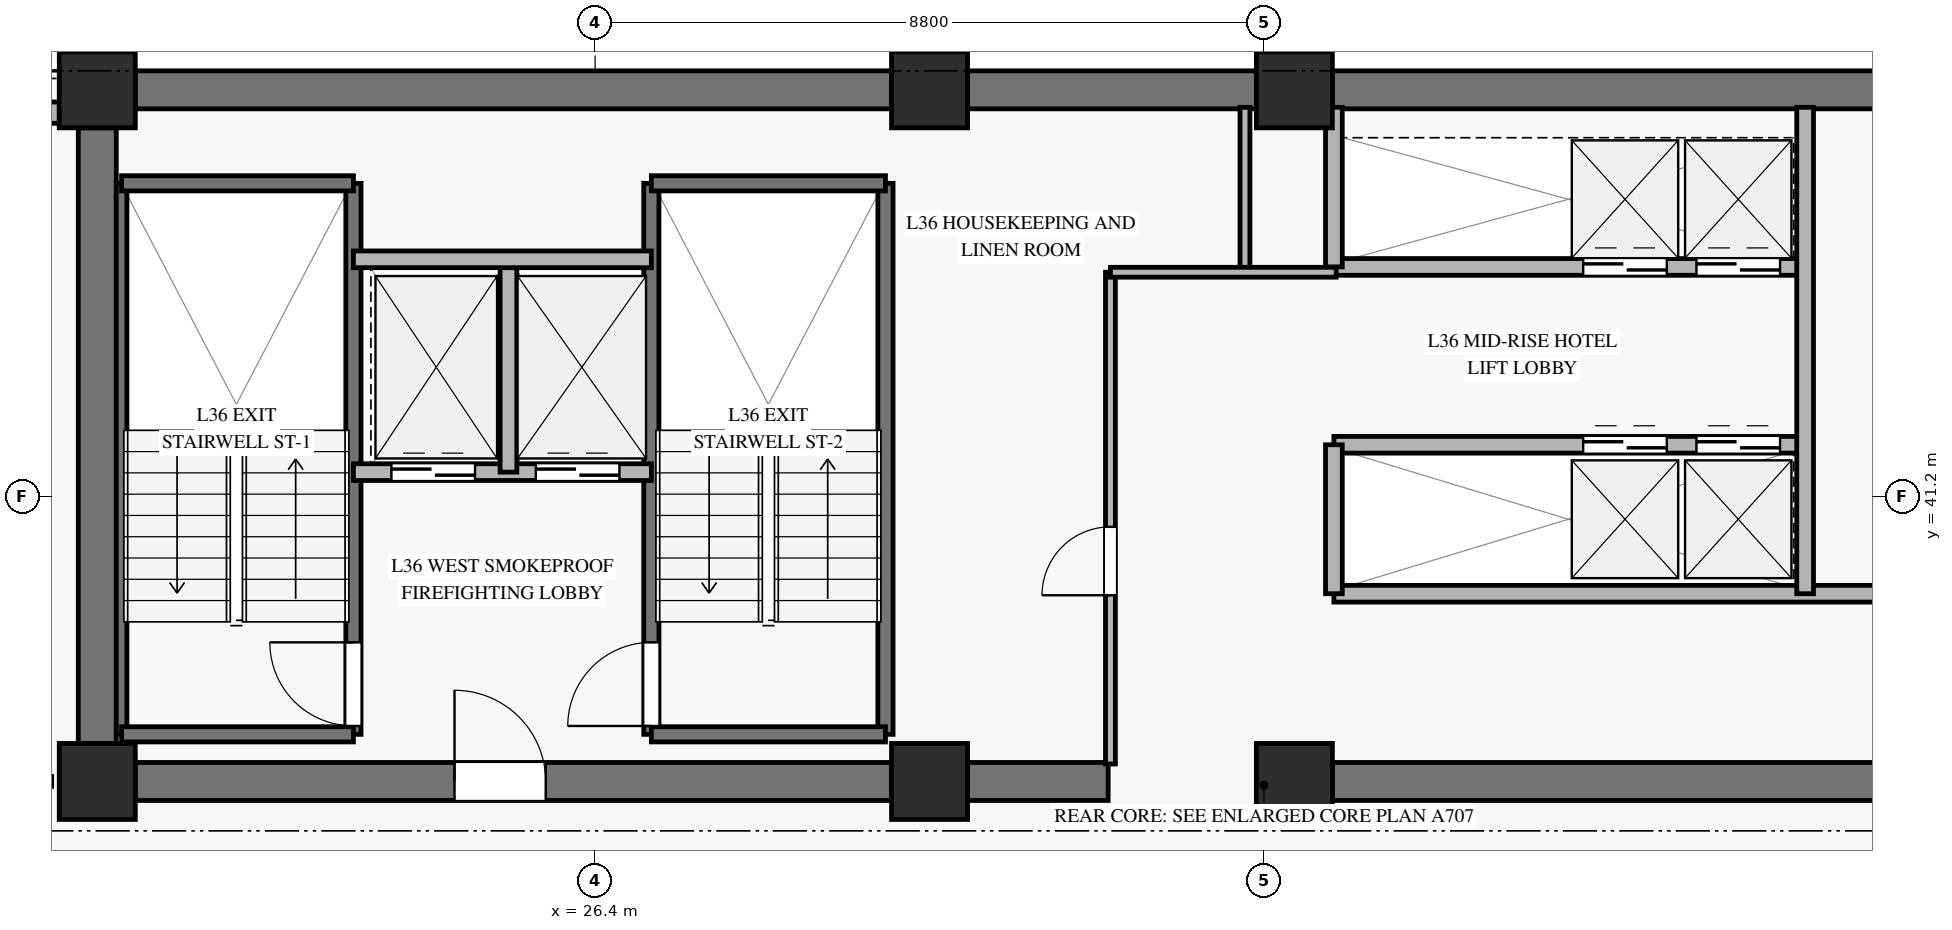
"""IFC4 building model, lengths in metres.
Left out: names, types, materials, properties, quantities, classifications, styles, units other than length and angle.
Written with IfcOpenShell. Run it as: python <this file> out.ifc"""

import sys

from ifc_helpers import new_model, si_unit, direction, frame, frame_2d, origin, origin_2d, place, context, subcontext, project, spatial, rectangle, extrude, source, transform, mapped, element, fill, save


model = new_model("IFC4")
c1 = context("Model", 3, precision=1e-05, world=origin(), true_north=direction((0.0, 1.0)))
c2 = subcontext(c1, "Body", "Model", "MODEL_VIEW")
j1 = project(units=[si_unit("LENGTHUNIT", "METRE"), si_unit("PLANEANGLEUNIT", "RADIAN")], contexts=[c1])
p1 = place(None, origin())
s1 = spatial("IfcSite", under=j1, at=p1, CompositionType="ELEMENT")
p2 = place(p1, origin())
s2 = spatial("IfcBuilding", under=s1, at=p2, CompositionType="ELEMENT")
p3 = place(p2, frame((0.0, 0.0, 149.2)))
s3 = spatial("IfcBuildingStorey", under=s2, at=p3, CompositionType="ELEMENT", Elevation=149.2)
m1 = source(origin(), c2, "Body", "SweptSolid", [
    extrude(rectangle(XDim=1.0, YDim=1.0, at=origin_2d()), origin(), (0.0, 0.0, 1.0), 3.27),
])
for number, where, z_axis, x_axis in (
    (1, (19.85, 37.45, 0.0), (0.0, 0.0, 1.0), (1.0, 0.0, 0.0)),
    (2, (19.85, 46.55, 0.0), (0.0, 0.0, 1.0), (1.0, 0.0, 0.0)),
    (3, (30.8, 37.45, 0.0), (0.0, 0.0, 1.0), (1.0, 0.0, 0.0)),
    (4, (30.8, 46.55, 0.0), (0.0, 0.0, 1.0), (1.0, 0.0, 0.0)),
    (5, (35.6, 37.45, 0.0), (0.0, 0.0, 1.0), (1.0, 0.0, 0.0)),
    (6, (35.6, 46.55, 0.0), (0.0, 0.0, 1.0), (1.0, 0.0, 0.0)),
):
    element("IfcColumn", number, at=place(p3, frame(where, z_axis=z_axis, x_axis=x_axis)), inside=s3, PredefinedType="PILASTER", context=c2, shape_type="MappedRepresentation", body=[
        mapped(m1, transform((0.0, 0.0, 0.0), x_axis=(1.0, 0.0, 0.0), y_axis=(0.0, 1.0, 0.0), z_axis=(0.0, 0.0, 1.0), scale=1.0)),
    ])
p4 = place(p3, frame((20.35, 46.55, 0.0), z_axis=(0.0, 0.0, 1.0), x_axis=(1.0, 0.0, 0.0)))
e7 = element("IfcWall", 7, at=p4, inside=s3, PredefinedType="SHEAR", context=c2, shape_type="SweptSolid", body=[
    extrude(rectangle(XDim=9.95, YDim=0.5, at=frame_2d((4.975, 0.0))), origin(), (0.0, 0.0, 1.0), 3.27),
])
p5 = place(p3, frame((31.3, 46.55, 0.0), z_axis=(0.0, 0.0, 1.0), x_axis=(1.0, 0.0, 0.0)))
e8 = element("IfcWall", 8, at=p5, inside=s3, PredefinedType="SHEAR", context=c2, shape_type="SweptSolid", body=[
    extrude(rectangle(XDim=3.8, YDim=0.5, at=frame_2d((1.9, 0.0))), origin(), (0.0, 0.0, 1.0), 3.27),
])
p6 = place(p3, frame((36.1, 46.55, 0.0), z_axis=(0.0, 0.0, 1.0), x_axis=(1.0, 0.0, 0.0)))
e9 = element("IfcWall", 9, at=p6, inside=s3, PredefinedType="SHEAR", context=c2, shape_type="SweptSolid", body=[
    extrude(rectangle(XDim=7.7, YDim=0.5, at=frame_2d((3.85, 0.0))), origin(), (0.0, 0.0, 1.0), 3.27),
])
p7 = place(p3, frame((20.35, 37.45, 0.0), z_axis=(0.0, 0.0, 1.0), x_axis=(1.0, 0.0, 0.0)))
e10 = element("IfcWall", 10, at=p7, inside=s3, PredefinedType="SHEAR", context=c2, shape_type="SweptSolid", body=[
    extrude(rectangle(XDim=9.95, YDim=0.5, at=frame_2d((4.975, 0.0))), origin(), (0.0, 0.0, 1.0), 3.27),
])
p8 = place(p7, frame((4.2, 0.0, 0.0)))
e11 = element("IfcOpeningElement", 11, at=p8, cuts=e10, PredefinedType="OPENING", context=c2, shape_type="SweptSolid", body=[
    extrude(rectangle(XDim=1.2, YDim=2.15, at=frame_2d((0.6, 1.075))), frame((0.0, 0.26, 0.0), z_axis=(0.0, -1.0, 0.0), x_axis=(1.0, 0.0, 0.0)), (0.0, 0.0, 1.0), 0.52),
])
p9 = place(p3, frame((31.3, 37.45, 0.0), z_axis=(0.0, 0.0, 1.0), x_axis=(1.0, 0.0, 0.0)))
e12 = element("IfcWall", 12, at=p9, inside=s3, PredefinedType="SHEAR", context=c2, shape_type="SweptSolid", body=[
    extrude(rectangle(XDim=1.85, YDim=0.5, at=frame_2d((0.925, 0.0))), origin(), (0.0, 0.0, 1.0), 3.27),
])
p10 = place(p3, frame((36.1, 37.45, 0.0), z_axis=(0.0, 0.0, 1.0), x_axis=(1.0, 0.0, 0.0)))
e13 = element("IfcWall", 13, at=p10, inside=s3, PredefinedType="SHEAR", context=c2, shape_type="SweptSolid", body=[
    extrude(rectangle(XDim=7.7, YDim=0.5, at=frame_2d((3.85, 0.0))), origin(), (0.0, 0.0, 1.0), 3.27),
])
p11 = place(p3, frame((19.85, 37.95, 0.0), z_axis=(0.0, 0.0, 1.0), x_axis=(0.0, 1.0, 0.0)))
e14 = element("IfcWall", 14, at=p11, inside=s3, PredefinedType="SHEAR", context=c2, shape_type="SweptSolid", body=[
    extrude(rectangle(XDim=8.1, YDim=0.5, at=frame_2d((4.05, 0.0))), origin(), (0.0, 0.0, 1.0), 3.27),
])
p12 = place(p3, frame((8.788, 46.25, 0.0), z_axis=(0.0, 0.0, 1.0), x_axis=(1.0, 0.0, 0.0)))
e15 = element("IfcWall", 15, at=p12, inside=s3, PredefinedType="SOLIDWALL", context=c2, shape_type="SweptSolid", body=[
    extrude(rectangle(XDim=10.562, YDim=0.28, at=frame_2d((5.281, 0.0))), origin(), (0.0, 0.0, 1.0), 2.75),
])
p13 = place(p12, frame((4.481, 0.0, 0.45)))
e16 = element("IfcOpeningElement", 16, at=p13, cuts=e15, PredefinedType="OPENING", context=c2, shape_type="SweptSolid", body=[
    extrude(rectangle(XDim=1.6, YDim=2.0, at=frame_2d((0.8, 1.0))), frame((0.0, 0.15, 0.0), z_axis=(0.0, -1.0, 0.0), x_axis=(1.0, 0.0, 0.0)), (0.0, 0.0, 1.0), 0.3),
])
p14 = place(p3, frame((20.17, 38.07, 0.0), z_axis=(0.0, 0.0, 1.0), x_axis=(0.0, 1.0, 0.0)))
e17 = element("IfcWall", 17, at=p14, inside=s3, PredefinedType="SOLIDWALL", context=c2, shape_type="SweptSolid", body=[
    extrude(rectangle(XDim=7.25, YDim=0.14, at=frame_2d((3.625, 0.0))), origin(), (0.0, 0.0, 1.0), 3.5),
])
p15 = place(p3, frame((23.22, 38.07, 0.0), z_axis=(0.0, 0.0, 1.0), x_axis=(0.0, 1.0, 0.0)))
e18 = element("IfcWall", 18, at=p15, inside=s3, PredefinedType="SOLIDWALL", context=c2, shape_type="SweptSolid", body=[
    extrude(rectangle(XDim=7.25, YDim=0.2, at=frame_2d((3.625, 0.0))), origin(), (0.0, 0.0, 1.0), 3.5),
])
p16 = place(p15, frame((0.11, 0.0, 0.0)))
e19 = element("IfcOpeningElement", 19, at=p16, cuts=e18, PredefinedType="OPENING", context=c2, shape_type="SweptSolid", body=[
    extrude(rectangle(XDim=1.1, YDim=2.15, at=frame_2d((0.55, 1.075))), frame((0.0, 0.11, 0.0), z_axis=(0.0, -1.0, 0.0), x_axis=(1.0, 0.0, 0.0)), (0.0, 0.0, 1.0), 0.22),
])
for number, where, z_axis, x_axis in (
    (20, (20.17, 45.32, 0.0), (0.0, 0.0, 1.0), (1.0, 0.0, 0.0)),
    (21, (20.17, 38.07, 0.0), (0.0, 0.0, 1.0), (1.0, 0.0, 0.0)),
):
    element("IfcWall", number, at=place(p3, frame(where, z_axis=z_axis, x_axis=x_axis)), inside=s3, PredefinedType="SOLIDWALL", context=c2, shape_type="SweptSolid", body=[
        extrude(rectangle(XDim=3.05, YDim=0.2, at=frame_2d((1.525, 0.0))), origin(), (0.0, 0.0, 1.0), 3.5),
    ])
p17 = place(p3, frame((27.14, 38.07, 0.0), z_axis=(0.0, 0.0, 1.0), x_axis=(0.0, 1.0, 0.0)))
e22 = element("IfcWall", 22, at=p17, inside=s3, PredefinedType="SOLIDWALL", context=c2, shape_type="SweptSolid", body=[
    extrude(rectangle(XDim=7.25, YDim=0.2, at=frame_2d((3.625, 0.0))), origin(), (0.0, 0.0, 1.0), 3.5),
])
p18 = place(p17, frame((0.11, 0.0, 0.0)))
e23 = element("IfcOpeningElement", 23, at=p18, cuts=e22, PredefinedType="OPENING", context=c2, shape_type="SweptSolid", body=[
    extrude(rectangle(XDim=1.1, YDim=2.15, at=frame_2d((0.55, 1.075))), frame((0.0, 0.11, 0.0), z_axis=(0.0, -1.0, 0.0), x_axis=(1.0, 0.0, 0.0)), (0.0, 0.0, 1.0), 0.22),
])
p19 = place(p3, frame((30.22, 38.07, 0.0), z_axis=(0.0, 0.0, 1.0), x_axis=(0.0, 1.0, 0.0)))
e24 = element("IfcWall", 24, at=p19, inside=s3, PredefinedType="SOLIDWALL", context=c2, shape_type="SweptSolid", body=[
    extrude(rectangle(XDim=7.25, YDim=0.2, at=frame_2d((3.625, 0.0))), origin(), (0.0, 0.0, 1.0), 3.5),
])
for number, where, z_axis, x_axis in (
    (25, (27.14, 45.32, 0.0), (0.0, 0.0, 1.0), (1.0, 0.0, 0.0)),
    (26, (27.14, 38.07, 0.0), (0.0, 0.0, 1.0), (1.0, 0.0, 0.0)),
):
    element("IfcWall", number, at=place(p3, frame(where, z_axis=z_axis, x_axis=x_axis)), inside=s3, PredefinedType="SOLIDWALL", context=c2, shape_type="SweptSolid", body=[
        extrude(rectangle(XDim=3.08, YDim=0.2, at=frame_2d((1.54, 0.0))), origin(), (0.0, 0.0, 1.0), 3.5),
    ])
p20 = place(p3, frame((23.22, 41.52, 0.0), z_axis=(0.0, 0.0, 1.0), x_axis=(1.0, 0.0, 0.0)))
e27 = element("IfcWall", 27, at=p20, inside=s3, PredefinedType="SOLIDWALL", context=c2, shape_type="SweptSolid", body=[
    extrude(rectangle(XDim=3.92, YDim=0.22, at=frame_2d((1.96, 0.0))), origin(), (0.0, 0.0, 1.0), 3.27),
])
p21 = place(p20, frame((0.5, 0.0, 0.0)))
e28 = element("IfcOpeningElement", 28, at=p21, cuts=e27, PredefinedType="OPENING", context=c2, shape_type="SweptSolid", body=[
    extrude(rectangle(XDim=1.1, YDim=2.2, at=frame_2d((0.55, 1.1))), frame((0.0, 0.12, 0.0), z_axis=(0.0, -1.0, 0.0), x_axis=(1.0, 0.0, 0.0)), (0.0, 0.0, 1.0), 0.24),
])
p22 = place(p20, frame((2.4, 0.0, 0.0)))
e29 = element("IfcOpeningElement", 29, at=p22, cuts=e27, PredefinedType="OPENING", context=c2, shape_type="SweptSolid", body=[
    extrude(rectangle(XDim=1.1, YDim=2.2, at=frame_2d((0.55, 1.1))), frame((0.0, 0.12, 0.0), z_axis=(0.0, -1.0, 0.0), x_axis=(1.0, 0.0, 0.0)), (0.0, 0.0, 1.0), 0.24),
])
p23 = place(p3, frame((25.26, 41.52, 0.0), z_axis=(0.0, 0.0, 1.0), x_axis=(0.0, 1.0, 0.0)))
e30 = element("IfcWall", 30, at=p23, inside=s3, PredefinedType="SOLIDWALL", context=c2, shape_type="SweptSolid", body=[
    extrude(rectangle(XDim=2.8, YDim=0.22, at=frame_2d((1.4, 0.0))), origin(), (0.0, 0.0, 1.0), 3.27),
])
p24 = place(p3, frame((23.22, 44.32, 0.0), z_axis=(0.0, 0.0, 1.0), x_axis=(1.0, 0.0, 0.0)))
e31 = element("IfcWall", 31, at=p24, inside=s3, PredefinedType="SOLIDWALL", context=c2, shape_type="SweptSolid", body=[
    extrude(rectangle(XDim=3.92, YDim=0.22, at=frame_2d((1.96, 0.0))), origin(), (0.0, 0.0, 1.0), 3.27),
])
p25 = place(p3, frame((36.12, 44.22, 0.0), z_axis=(0.0, 0.0, 1.0), x_axis=(1.0, 0.0, 0.0)))
e32 = element("IfcWall", 32, at=p25, inside=s3, PredefinedType="SOLIDWALL", context=c2, shape_type="SweptSolid", body=[
    extrude(rectangle(XDim=6.2, YDim=0.22, at=frame_2d((3.1, 0.0))), origin(), (0.0, 0.0, 1.0), 3.27),
])
p26 = place(p25, frame((3.28, 0.0, 0.0)))
e33 = element("IfcOpeningElement", 33, at=p26, cuts=e32, PredefinedType="OPENING", context=c2, shape_type="SweptSolid", body=[
    extrude(rectangle(XDim=1.1, YDim=2.2, at=frame_2d((0.55, 1.1))), frame((0.0, 0.12, 0.0), z_axis=(0.0, -1.0, 0.0), x_axis=(1.0, 0.0, 0.0)), (0.0, 0.0, 1.0), 0.24),
])
p27 = place(p25, frame((4.77, 0.0, 0.0)))
e34 = element("IfcOpeningElement", 34, at=p27, cuts=e32, PredefinedType="OPENING", context=c2, shape_type="SweptSolid", body=[
    extrude(rectangle(XDim=1.1, YDim=2.2, at=frame_2d((0.55, 1.1))), frame((0.0, 0.12, 0.0), z_axis=(0.0, -1.0, 0.0), x_axis=(1.0, 0.0, 0.0)), (0.0, 0.0, 1.0), 0.24),
])
p28 = place(p3, frame((36.12, 41.88, 0.0), z_axis=(0.0, 0.0, 1.0), x_axis=(1.0, 0.0, 0.0)))
e35 = element("IfcWall", 35, at=p28, inside=s3, PredefinedType="SOLIDWALL", context=c2, shape_type="SweptSolid", body=[
    extrude(rectangle(XDim=6.2, YDim=0.22, at=frame_2d((3.1, 0.0))), origin(), (0.0, 0.0, 1.0), 3.27),
])
p29 = place(p28, frame((3.28, 0.0, 0.0)))
e36 = element("IfcOpeningElement", 36, at=p29, cuts=e35, PredefinedType="OPENING", context=c2, shape_type="SweptSolid", body=[
    extrude(rectangle(XDim=1.1, YDim=2.2, at=frame_2d((0.55, 1.1))), frame((0.0, 0.12, 0.0), z_axis=(0.0, -1.0, 0.0), x_axis=(1.0, 0.0, 0.0)), (0.0, 0.0, 1.0), 0.24),
])
p30 = place(p28, frame((4.77, 0.0, 0.0)))
e37 = element("IfcOpeningElement", 37, at=p30, cuts=e35, PredefinedType="OPENING", context=c2, shape_type="SweptSolid", body=[
    extrude(rectangle(XDim=1.1, YDim=2.2, at=frame_2d((0.55, 1.1))), frame((0.0, 0.12, 0.0), z_axis=(0.0, -1.0, 0.0), x_axis=(1.0, 0.0, 0.0)), (0.0, 0.0, 1.0), 0.24),
])
p31 = place(p3, frame((36.12, 39.92, 0.0), z_axis=(0.0, 0.0, 1.0), x_axis=(1.0, 0.0, 0.0)))
e38 = element("IfcWall", 38, at=p31, inside=s3, PredefinedType="SOLIDWALL", context=c2, shape_type="SweptSolid", body=[
    extrude(rectangle(XDim=8.6, YDim=0.22, at=frame_2d((4.3, 0.0))), origin(), (0.0, 0.0, 1.0), 2.555),
])
p32 = place(p3, frame((42.32, 39.92, 0.0), z_axis=(0.0, 0.0, 1.0), x_axis=(0.0, 1.0, 0.0)))
e39 = element("IfcWall", 39, at=p32, inside=s3, PredefinedType="SOLIDWALL", context=c2, shape_type="SweptSolid", body=[
    extrude(rectangle(XDim=6.4, YDim=0.22, at=frame_2d((3.2, 0.0))), origin(), (0.0, 0.0, 1.0), 3.27),
])
p33 = place(p3, frame((36.12, 39.92, 0.0), z_axis=(0.0, 0.0, 1.0), x_axis=(0.0, 1.0, 0.0)))
e40 = element("IfcWall", 40, at=p33, inside=s3, PredefinedType="SOLIDWALL", context=c2, shape_type="SweptSolid", body=[
    extrude(rectangle(XDim=1.96, YDim=0.22, at=frame_2d((0.98, 0.0))), origin(), (0.0, 0.0, 1.0), 3.27),
])
p34 = place(p3, frame((36.12, 44.22, 0.0), z_axis=(0.0, 0.0, 1.0), x_axis=(0.0, 1.0, 0.0)))
e41 = element("IfcWall", 41, at=p34, inside=s3, PredefinedType="SOLIDWALL", context=c2, shape_type="SweptSolid", body=[
    extrude(rectangle(XDim=2.1, YDim=0.22, at=frame_2d((1.05, 0.0))), origin(), (0.0, 0.0, 1.0), 3.27),
])
p35 = place(p3, frame((33.18, 37.68, 0.0), z_axis=(0.0, 0.0, 1.0), x_axis=(0.0, 1.0, 0.0)))
e42 = element("IfcWall", 42, at=p35, inside=s3, PredefinedType="PARTITIONING", context=c2, shape_type="SweptSolid", body=[
    extrude(rectangle(XDim=6.47, YDim=0.13, at=frame_2d((3.235, 0.0))), origin(), (0.0, 0.0, 1.0), 2.355),
])
p36 = place(p35, frame((2.22, 0.0, 0.0)))
e43 = element("IfcOpeningElement", 43, at=p36, cuts=e42, PredefinedType="OPENING", context=c2, shape_type="SweptSolid", body=[
    extrude(rectangle(XDim=0.9, YDim=2.1, at=frame_2d((0.45, 1.05))), frame((0.0, 0.075, 0.0), z_axis=(0.0, -1.0, 0.0), x_axis=(1.0, 0.0, 0.0)), (0.0, 0.0, 1.0), 0.15),
])
p37 = place(p3, frame((34.95, 44.15, 0.0), z_axis=(0.0, 0.0, 1.0), x_axis=(0.0, 1.0, 0.0)))
e44 = element("IfcWall", 44, at=p37, inside=s3, PredefinedType="PARTITIONING", context=c2, shape_type="SweptSolid", body=[
    extrude(rectangle(XDim=2.17, YDim=0.13, at=frame_2d((1.085, 0.0))), origin(), (0.0, 0.0, 1.0), 3.27),
])
p38 = place(p3, frame((33.18, 44.15, 0.0), z_axis=(0.0, 0.0, 1.0), x_axis=(1.0, 0.0, 0.0)))
e45 = element("IfcWall", 45, at=p38, inside=s3, PredefinedType="PARTITIONING", context=c2, shape_type="SweptSolid", body=[
    extrude(rectangle(XDim=2.97, YDim=0.13, at=frame_2d((1.485, 0.0))), origin(), (0.0, 0.0, 1.0), 2.555),
])
m2 = source(origin(), c2, "Body", "SweptSolid", [
    extrude(rectangle(XDim=1.1, YDim=2.15, at=frame_2d((0.55, 1.075))), frame((0.0, 0.025, 0.0), z_axis=(0.0, -1.0, 0.0), x_axis=(1.0, 0.0, 0.0)), (0.0, 0.0, 1.0), 0.05),
])
p39 = place(p16, origin())
e46 = element("IfcDoor", 46, at=p39, inside=s3, OperationType="SINGLE_SWING_RIGHT", PredefinedType="DOOR", context=c2, shape_type="MappedRepresentation", body=[
    mapped(m2, transform((0.0, 0.0, 0.0), x_axis=(1.0, 0.0, 0.0), y_axis=(0.0, 1.0, 0.0), z_axis=(0.0, 0.0, 1.0), scale=1.0)),
])
fill(e19, e46)
p40 = place(p18, origin())
e47 = element("IfcDoor", 47, at=p40, inside=s3, OperationType="SINGLE_SWING_LEFT", PredefinedType="DOOR", context=c2, shape_type="MappedRepresentation", body=[
    mapped(m2, transform((0.0, 0.0, 0.0), x_axis=(1.0, 0.0, 0.0), y_axis=(0.0, 1.0, 0.0), z_axis=(0.0, 0.0, 1.0), scale=1.0)),
])
fill(e23, e47)
m3 = source(origin(), c2, "Body", "SweptSolid", [
    extrude(rectangle(XDim=1.1, YDim=2.2, at=frame_2d((0.55, 1.1))), frame((0.0, 0.025, 0.0), z_axis=(0.0, -1.0, 0.0), x_axis=(1.0, 0.0, 0.0)), (0.0, 0.0, 1.0), 0.05),
])
p41 = place(p21, origin())
e48 = element("IfcDoor", 48, at=p41, inside=s3, OperationType="SLIDING_TO_LEFT", PredefinedType="DOOR", context=c2, shape_type="MappedRepresentation", body=[
    mapped(m3, transform((0.0, 0.0, 0.0), x_axis=(1.0, 0.0, 0.0), y_axis=(0.0, 1.0, 0.0), z_axis=(0.0, 0.0, 1.0), scale=1.0)),
])
fill(e28, e48)
p42 = place(p22, origin())
e49 = element("IfcDoor", 49, at=p42, inside=s3, OperationType="SLIDING_TO_LEFT", PredefinedType="DOOR", context=c2, shape_type="MappedRepresentation", body=[
    mapped(m3, transform((0.0, 0.0, 0.0), x_axis=(1.0, 0.0, 0.0), y_axis=(0.0, 1.0, 0.0), z_axis=(0.0, 0.0, 1.0), scale=1.0)),
])
fill(e29, e49)
m4 = source(origin(), c2, "Body", "SweptSolid", [
    extrude(rectangle(XDim=1.2, YDim=2.15, at=frame_2d((0.6, 1.075))), frame((0.0, 0.025, 0.0), z_axis=(0.0, -1.0, 0.0), x_axis=(1.0, 0.0, 0.0)), (0.0, 0.0, 1.0), 0.05),
])
p43 = place(p8, origin())
e50 = element("IfcDoor", 50, at=p43, inside=s3, OperationType="SINGLE_SWING_LEFT", PredefinedType="DOOR", context=c2, shape_type="MappedRepresentation", body=[
    mapped(m4, transform((0.0, 0.0, 0.0), x_axis=(1.0, 0.0, 0.0), y_axis=(0.0, 1.0, 0.0), z_axis=(0.0, 0.0, 1.0), scale=1.0)),
])
fill(e11, e50)
p44 = place(p26, origin())
e51 = element("IfcDoor", 51, at=p44, inside=s3, OperationType="SLIDING_TO_LEFT", PredefinedType="DOOR", context=c2, shape_type="MappedRepresentation", body=[
    mapped(m3, transform((0.0, 0.0, 0.0), x_axis=(1.0, 0.0, 0.0), y_axis=(0.0, 1.0, 0.0), z_axis=(0.0, 0.0, 1.0), scale=1.0)),
])
fill(e33, e51)
p45 = place(p27, origin())
e52 = element("IfcDoor", 52, at=p45, inside=s3, OperationType="SLIDING_TO_LEFT", PredefinedType="DOOR", context=c2, shape_type="MappedRepresentation", body=[
    mapped(m3, transform((0.0, 0.0, 0.0), x_axis=(1.0, 0.0, 0.0), y_axis=(0.0, 1.0, 0.0), z_axis=(0.0, 0.0, 1.0), scale=1.0)),
])
fill(e34, e52)
p46 = place(p29, origin())
e53 = element("IfcDoor", 53, at=p46, inside=s3, OperationType="SLIDING_TO_LEFT", PredefinedType="DOOR", context=c2, shape_type="MappedRepresentation", body=[
    mapped(m3, transform((0.0, 0.0, 0.0), x_axis=(1.0, 0.0, 0.0), y_axis=(0.0, 1.0, 0.0), z_axis=(0.0, 0.0, 1.0), scale=1.0)),
])
fill(e36, e53)
p47 = place(p30, origin())
e54 = element("IfcDoor", 54, at=p47, inside=s3, OperationType="SLIDING_TO_LEFT", PredefinedType="DOOR", context=c2, shape_type="MappedRepresentation", body=[
    mapped(m3, transform((0.0, 0.0, 0.0), x_axis=(1.0, 0.0, 0.0), y_axis=(0.0, 1.0, 0.0), z_axis=(0.0, 0.0, 1.0), scale=1.0)),
])
fill(e37, e54)
m5 = source(origin(), c2, "Body", "SweptSolid", [
    extrude(rectangle(XDim=0.9, YDim=2.1, at=frame_2d((0.45, 1.05))), frame((0.0, 0.025, 0.0), z_axis=(0.0, -1.0, 0.0), x_axis=(1.0, 0.0, 0.0)), (0.0, 0.0, 1.0), 0.05),
])
p48 = place(p36, origin())
e55 = element("IfcDoor", 55, at=p48, inside=s3, OperationType="SINGLE_SWING_LEFT", PredefinedType="DOOR", context=c2, shape_type="MappedRepresentation", body=[
    mapped(m5, transform((0.0, 0.0, 0.0), x_axis=(1.0, 0.0, 0.0), y_axis=(0.0, 1.0, 0.0), z_axis=(0.0, 0.0, 1.0), scale=1.0)),
])
fill(e43, e55)
save(model, sys.argv[1])
